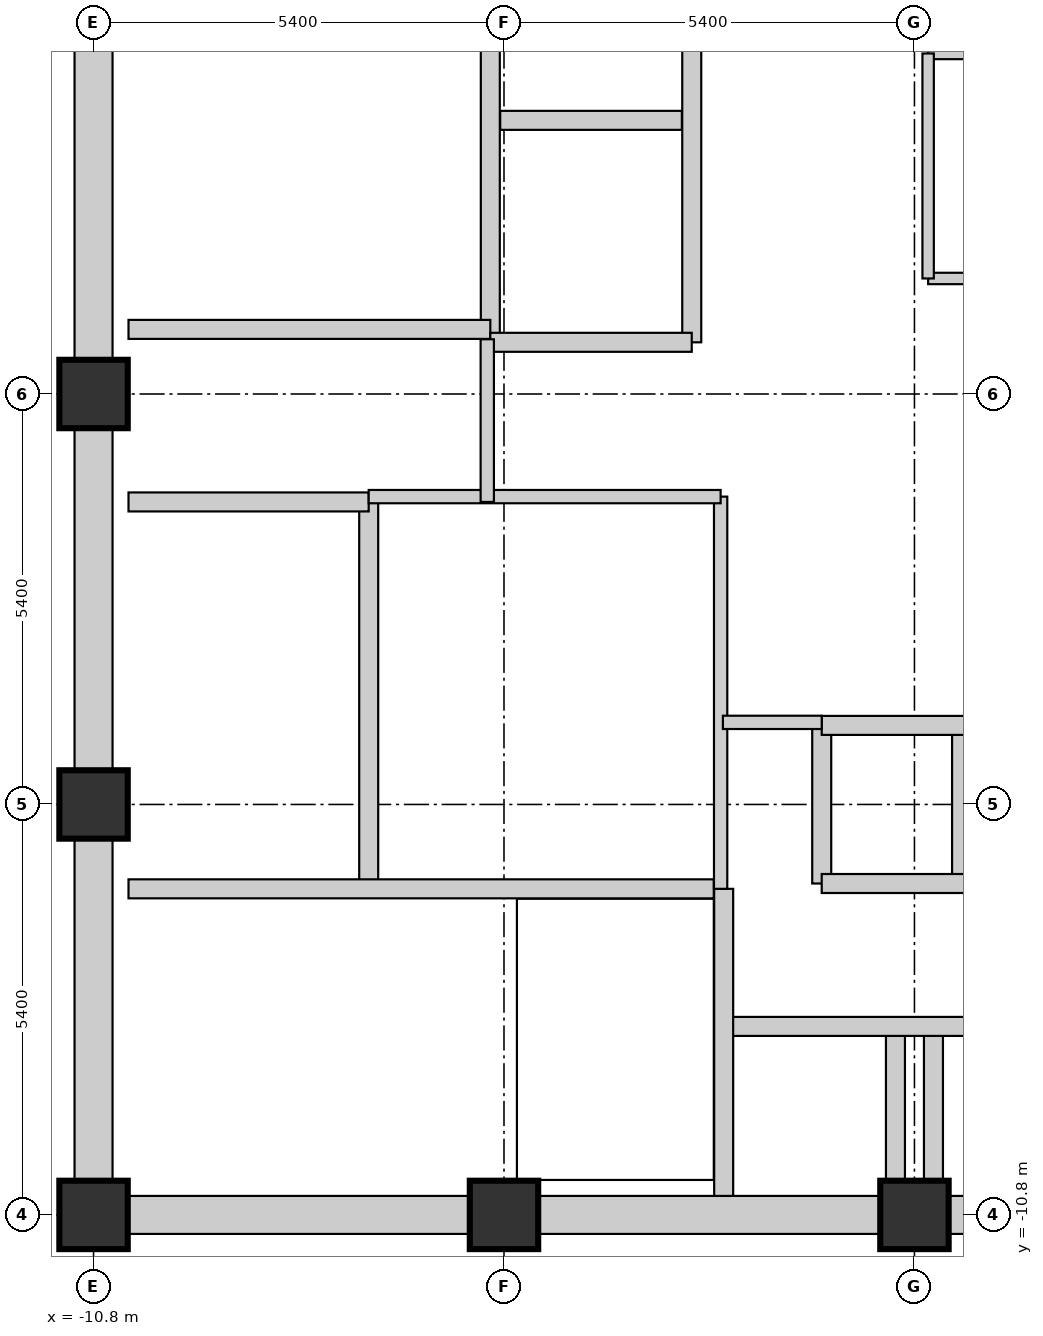
"""IFC4 building model, lengths in metres.
Left out: names, types, materials, properties, quantities, classifications, styles, units other than length and angle.
Written with IfcOpenShell. Run it as: python <this file> out.ifc"""

import sys

from ifc_helpers import new_model, si_unit, direction, frame, frame_2d, origin, origin_2d, place, context, subcontext, project, spatial, rectangle, extrude, element, fill, save


model = new_model("IFC4")
c1 = context("Model", 3, precision=1e-05, world=origin(), true_north=direction((0.0, 1.0)))
c2 = subcontext(c1, "Body", "Model", "MODEL_VIEW")
j1 = project(units=[si_unit("LENGTHUNIT", "METRE"), si_unit("PLANEANGLEUNIT", "RADIAN")], contexts=[c1])
p1 = place(None, origin())
s1 = spatial("IfcSite", under=j1, at=p1, CompositionType="ELEMENT")
p2 = place(p1, origin())
s2 = spatial("IfcBuilding", under=s1, at=p2, CompositionType="ELEMENT")
p3 = place(p2, frame((0.0, 0.0, 337.5)))
s3 = spatial("IfcBuildingStorey", under=s2, at=p3, CompositionType="ELEMENT", Elevation=337.5)
for number, where, z_axis, x_axis in (
    (1, (-10.8, -10.8, 0.0), (0.0, 0.0, 1.0), (1.0, 0.0, 0.0)),
    (2, (-10.8, -5.4, 0.0), (0.0, 0.0, 1.0), (1.0, 0.0, 0.0)),
    (3, (-10.8, 0.0, 0.0), (0.0, 0.0, 1.0), (1.0, 0.0, 0.0)),
    (4, (-5.4, -10.8, 0.0), (0.0, 0.0, 1.0), (1.0, 0.0, 0.0)),
    (5, (0.0, -10.8, 0.0), (0.0, 0.0, 1.0), (1.0, 0.0, 0.0)),
):
    element("IfcColumn", number, at=place(p3, frame(where, z_axis=z_axis, x_axis=x_axis)), inside=s3, PredefinedType="COLUMN", context=c2, shape_type="SweptSolid", body=[
        extrude(rectangle(XDim=0.9, YDim=0.9, at=origin_2d()), origin(), (0.0, 0.0, 1.0), 4.5),
    ])
for number, where, z_axis, x_axis in (
    (6, (-10.34, -10.8, 0.0), (0.0, 0.0, 1.0), (1.0, 0.0, 0.0)),
    (7, (-10.8, -10.34, 0.0), (0.0, 0.0, 1.0), (0.0, 1.0, 0.0)),
    (8, (-4.94, -10.8, 0.0), (0.0, 0.0, 1.0), (1.0, 0.0, 0.0)),
):
    element("IfcWall", number, at=place(p3, frame(where, z_axis=z_axis, x_axis=x_axis)), inside=s3, PredefinedType="SHEAR", context=c2, shape_type="SweptSolid", body=[
        extrude(rectangle(XDim=4.48, YDim=0.5, at=frame_2d((2.24, 0.0))), origin(), (0.0, 0.0, 1.0), 4.5),
    ])
p4 = place(p3, frame((-10.8, -4.94, 0.0), z_axis=(0.0, 0.0, 1.0), x_axis=(0.0, 1.0, 0.0)))
e9 = element("IfcWall", 9, at=p4, inside=s3, PredefinedType="SHEAR", context=c2, shape_type="SweptSolid", body=[
    extrude(rectangle(XDim=4.48, YDim=0.5, at=frame_2d((2.24, 0.0))), origin(), (0.0, 0.0, 1.0), 4.5),
])
p5 = place(p4, frame((1.69, 0.0, 0.0)))
e10 = element("IfcOpeningElement", 10, at=p5, cuts=e9, PredefinedType="OPENING", context=c2, shape_type="SweptSolid", body=[
    extrude(rectangle(XDim=1.1, YDim=2.1, at=frame_2d((0.55, 1.05))), frame((0.0, 0.26, 0.0), z_axis=(0.0, -1.0, 0.0), x_axis=(1.0, 0.0, 0.0)), (0.0, 0.0, 1.0), 0.52),
])
p6 = place(p3, frame((0.46, -10.8, 0.0), z_axis=(0.0, 0.0, 1.0), x_axis=(1.0, 0.0, 0.0)))
e11 = element("IfcWall", 11, at=p6, inside=s3, PredefinedType="SHEAR", context=c2, shape_type="SweptSolid", body=[
    extrude(rectangle(XDim=4.48, YDim=0.5, at=frame_2d((2.24, 0.0))), origin(), (0.0, 0.0, 1.0), 4.5),
])
p7 = place(p3, frame((-10.8, 0.46, 0.0), z_axis=(0.0, 0.0, 1.0), x_axis=(0.0, 1.0, 0.0)))
e12 = element("IfcWall", 12, at=p7, inside=s3, PredefinedType="SHEAR", context=c2, shape_type="SweptSolid", body=[
    extrude(rectangle(XDim=4.48, YDim=0.5, at=frame_2d((2.24, 0.0))), origin(), (0.0, 0.0, 1.0), 4.5),
])
p8 = place(p7, frame((1.69, 0.0, 0.0)))
e13 = element("IfcOpeningElement", 13, at=p8, cuts=e12, PredefinedType="OPENING", context=c2, shape_type="SweptSolid", body=[
    extrude(rectangle(XDim=1.1, YDim=2.1, at=frame_2d((0.55, 1.05))), frame((0.0, 0.26, 0.0), z_axis=(0.0, -1.0, 0.0), x_axis=(1.0, 0.0, 0.0)), (0.0, 0.0, 1.0), 0.52),
])
p9 = place(p3, frame((-5.58, 0.72, 0.0), z_axis=(0.0, 0.0, 1.0), x_axis=(0.0, 1.0, 0.0)))
e14 = element("IfcWall", 14, at=p9, inside=s3, PredefinedType="SHEAR", context=c2, shape_type="SweptSolid", body=[
    extrude(rectangle(XDim=5.79, YDim=0.25, at=frame_2d((2.895, 0.0))), origin(), (0.0, 0.0, 1.0), 4.5),
])
p10 = place(p9, frame((3.35, 0.0, 0.0)))
e15 = element("IfcOpeningElement", 15, at=p10, cuts=e14, PredefinedType="OPENING", context=c2, shape_type="SweptSolid", body=[
    extrude(rectangle(XDim=1.1, YDim=2.1, at=frame_2d((0.55, 1.05))), frame((0.0, 0.135, 0.0), z_axis=(0.0, -1.0, 0.0), x_axis=(1.0, 0.0, 0.0)), (0.0, 0.0, 1.0), 0.27),
])
p11 = place(p3, frame((-10.34, 0.85, 0.0), z_axis=(0.0, 0.0, 1.0), x_axis=(1.0, 0.0, 0.0)))
e16 = element("IfcWall", 16, at=p11, inside=s3, PredefinedType="SHEAR", context=c2, shape_type="SweptSolid", body=[
    extrude(rectangle(XDim=4.76, YDim=0.25, at=frame_2d((2.38, 0.0))), origin(), (0.0, 0.0, 1.0), 4.5),
])
p12 = place(p11, frame((1.4, 0.0, 0.0)))
e17 = element("IfcOpeningElement", 17, at=p12, cuts=e16, PredefinedType="OPENING", context=c2, shape_type="SweptSolid", body=[
    extrude(rectangle(XDim=0.95, YDim=2.1, at=frame_2d((0.475, 1.05))), frame((0.0, 0.135, 0.0), z_axis=(0.0, -1.0, 0.0), x_axis=(1.0, 0.0, 0.0)), (0.0, 0.0, 1.0), 0.27),
])
p13 = place(p3, frame((0.62, -6.34, 0.0), z_axis=(0.0, 0.0, 1.0), x_axis=(0.0, 1.0, 0.0)))
e18 = element("IfcWall", 18, at=p13, inside=s3, PredefinedType="SHEAR", context=c2, shape_type="SweptSolid", body=[
    extrude(rectangle(XDim=1.88, YDim=0.25, at=frame_2d((0.94, 0.0))), origin(), (0.0, 0.0, 1.0), 4.5),
])
for number, where, z_axis, x_axis in (
    (19, (-0.25, -10.35, 0.0), (0.0, 0.0, 1.0), (0.0, 1.0, 0.0)),
    (20, (0.25, -10.35, 0.0), (0.0, 0.0, 1.0), (0.0, 1.0, 0.0)),
):
    element("IfcWall", number, at=place(p3, frame(where, z_axis=z_axis, x_axis=x_axis)), inside=s3, PredefinedType="SHEAR", context=c2, shape_type="SweptSolid", body=[
        extrude(rectangle(XDim=1.91, YDim=0.25, at=frame_2d((0.955, 0.0))), origin(), (0.0, 0.0, 1.0), 4.5),
    ])
p14 = place(p3, frame((-1.22, -6.44, 0.0), z_axis=(0.0, 0.0, 1.0), x_axis=(0.0, 1.0, 0.0)))
e21 = element("IfcWall", 21, at=p14, inside=s3, PredefinedType="SHEAR", context=c2, shape_type="SweptSolid", body=[
    extrude(rectangle(XDim=2.08, YDim=0.25, at=frame_2d((1.04, 0.0))), origin(), (0.0, 0.0, 1.0), 4.5),
])
p15 = place(p3, frame((-1.22, -6.44, 0.0), z_axis=(0.0, 0.0, 1.0), x_axis=(1.0, 0.0, 0.0)))
e22 = element("IfcWall", 22, at=p15, inside=s3, PredefinedType="SHEAR", context=c2, shape_type="SweptSolid", body=[
    extrude(rectangle(XDim=3.67, YDim=0.25, at=frame_2d((1.835, 0.0))), origin(), (0.0, 0.0, 1.0), 4.5),
])
p16 = place(p15, frame((0.35, 0.0, 0.0)))
e23 = element("IfcOpeningElement", 23, at=p16, cuts=e22, PredefinedType="OPENING", context=c2, shape_type="SweptSolid", body=[
    extrude(rectangle(XDim=1.1, YDim=2.1, at=frame_2d((0.55, 1.05))), frame((0.0, 0.135, 0.0), z_axis=(0.0, -1.0, 0.0), x_axis=(1.0, 0.0, 0.0)), (0.0, 0.0, 1.0), 0.27),
])
p17 = place(p15, frame((2.22, 0.0, 0.0)))
e24 = element("IfcOpeningElement", 24, at=p17, cuts=e22, PredefinedType="OPENING", context=c2, shape_type="SweptSolid", body=[
    extrude(rectangle(XDim=1.1, YDim=2.1, at=frame_2d((0.55, 1.05))), frame((0.0, 0.135, 0.0), z_axis=(0.0, -1.0, 0.0), x_axis=(1.0, 0.0, 0.0)), (0.0, 0.0, 1.0), 0.27),
])
p18 = place(p3, frame((-2.48, -8.32, 0.0), z_axis=(0.0, 0.0, 1.0), x_axis=(1.0, 0.0, 0.0)))
e25 = element("IfcWall", 25, at=p18, inside=s3, PredefinedType="SHEAR", context=c2, shape_type="SweptSolid", body=[
    extrude(rectangle(XDim=4.93, YDim=0.25, at=frame_2d((2.465, 0.0))), origin(), (0.0, 0.0, 1.0), 4.5),
])
p19 = place(p18, frame((0.55, 0.0, 0.0)))
e26 = element("IfcOpeningElement", 26, at=p19, cuts=e25, PredefinedType="OPENING", context=c2, shape_type="SweptSolid", body=[
    extrude(rectangle(XDim=1.1, YDim=2.1, at=frame_2d((0.55, 1.05))), frame((0.0, 0.135, 0.0), z_axis=(0.0, -1.0, 0.0), x_axis=(1.0, 0.0, 0.0)), (0.0, 0.0, 1.0), 0.27),
])
p20 = place(p18, frame((3.25, 0.0, 0.0)))
e27 = element("IfcOpeningElement", 27, at=p20, cuts=e25, PredefinedType="OPENING", context=c2, shape_type="SweptSolid", body=[
    extrude(rectangle(XDim=1.1, YDim=2.1, at=frame_2d((0.55, 1.05))), frame((0.0, 0.135, 0.0), z_axis=(0.0, -1.0, 0.0), x_axis=(1.0, 0.0, 0.0)), (0.0, 0.0, 1.0), 0.27),
])
p21 = place(p3, frame((-1.22, -4.36, 0.0), z_axis=(0.0, 0.0, 1.0), x_axis=(1.0, 0.0, 0.0)))
e28 = element("IfcWall", 28, at=p21, inside=s3, PredefinedType="SHEAR", context=c2, shape_type="SweptSolid", body=[
    extrude(rectangle(XDim=4.03, YDim=0.25, at=frame_2d((2.015, 0.0))), origin(), (0.0, 0.0, 1.0), 4.5),
])
p22 = place(p3, frame((-2.51, -10.55, 0.0), z_axis=(0.0, 0.0, 1.0), x_axis=(0.0, 1.0, 0.0)))
e29 = element("IfcWall", 29, at=p22, inside=s3, PredefinedType="SHEAR", context=c2, shape_type="SweptSolid", body=[
    extrude(rectangle(XDim=4.04, YDim=0.25, at=frame_2d((2.02, 0.0))), origin(), (0.0, 0.0, 1.0), 4.5),
])
p23 = place(p3, frame((-7.18, -6.51, 0.0), z_axis=(0.0, 0.0, 1.0), x_axis=(0.0, 1.0, 0.0)))
e30 = element("IfcWall", 30, at=p23, inside=s3, PredefinedType="SHEAR", context=c2, shape_type="SweptSolid", body=[
    extrude(rectangle(XDim=5.09, YDim=0.25, at=frame_2d((2.545, 0.0))), origin(), (0.0, 0.0, 1.0), 4.5),
])
p24 = place(p3, frame((-10.34, -1.42, 0.0), z_axis=(0.0, 0.0, 1.0), x_axis=(1.0, 0.0, 0.0)))
e31 = element("IfcWall", 31, at=p24, inside=s3, PredefinedType="SHEAR", context=c2, shape_type="SweptSolid", body=[
    extrude(rectangle(XDim=3.16, YDim=0.25, at=frame_2d((1.58, 0.0))), origin(), (0.0, 0.0, 1.0), 4.5),
])
p25 = place(p3, frame((-10.34, -6.51, 0.0), z_axis=(0.0, 0.0, 1.0), x_axis=(1.0, 0.0, 0.0)))
e32 = element("IfcWall", 32, at=p25, inside=s3, PredefinedType="SHEAR", context=c2, shape_type="SweptSolid", body=[
    extrude(rectangle(XDim=7.7, YDim=0.25, at=frame_2d((3.85, 0.0))), origin(), (0.0, 0.0, 1.0), 4.5),
])
p26 = place(p25, frame((0.35, 0.0, 0.0)))
e33 = element("IfcOpeningElement", 33, at=p26, cuts=e32, PredefinedType="OPENING", context=c2, shape_type="SweptSolid", body=[
    extrude(rectangle(XDim=1.1, YDim=2.1, at=frame_2d((0.55, 1.05))), frame((0.0, 0.135, 0.0), z_axis=(0.0, -1.0, 0.0), x_axis=(1.0, 0.0, 0.0)), (0.0, 0.0, 1.0), 0.27),
])
p27 = place(p3, frame((-2.93, 0.68, 0.0), z_axis=(0.0, 0.0, 1.0), x_axis=(0.0, 1.0, 0.0)))
e34 = element("IfcWall", 34, at=p27, inside=s3, PredefinedType="SHEAR", context=c2, shape_type="SweptSolid", body=[
    extrude(rectangle(XDim=5.83, YDim=0.25, at=frame_2d((2.915, 0.0))), origin(), (0.0, 0.0, 1.0), 4.5),
])
p28 = place(p27, frame((0.75, 0.0, 0.0)))
e35 = element("IfcOpeningElement", 35, at=p28, cuts=e34, PredefinedType="OPENING", context=c2, shape_type="SweptSolid", body=[
    extrude(rectangle(XDim=1.2, YDim=2.1, at=frame_2d((0.6, 1.05))), frame((0.0, 0.135, 0.0), z_axis=(0.0, -1.0, 0.0), x_axis=(1.0, 0.0, 0.0)), (0.0, 0.0, 1.0), 0.27),
])
p29 = place(p3, frame((-5.45, 3.6, 0.0), z_axis=(0.0, 0.0, 1.0), x_axis=(1.0, 0.0, 0.0)))
e36 = element("IfcWall", 36, at=p29, inside=s3, PredefinedType="SHEAR", context=c2, shape_type="SweptSolid", body=[
    extrude(rectangle(XDim=2.39, YDim=0.25, at=frame_2d((1.195, 0.0))), origin(), (0.0, 0.0, 1.0), 4.5),
])
p30 = place(p3, frame((-5.58, 0.68, 0.0), z_axis=(0.0, 0.0, 1.0), x_axis=(1.0, 0.0, 0.0)))
e37 = element("IfcWall", 37, at=p30, inside=s3, PredefinedType="SHEAR", context=c2, shape_type="SweptSolid", body=[
    extrude(rectangle(XDim=2.65, YDim=0.25, at=frame_2d((1.325, 0.0))), origin(), (0.0, 0.0, 1.0), 4.5),
])
for number, where, z_axis, x_axis in (
    (38, (0.18, 4.48, 0.0), (0.0, 0.0, 1.0), (1.0, 0.0, 0.0)),
    (39, (0.18, 1.52, 0.0), (0.0, 0.0, 1.0), (1.0, 0.0, 0.0)),
):
    element("IfcWall", number, at=place(p3, frame(where, z_axis=z_axis, x_axis=x_axis)), inside=s3, PredefinedType="PARTITIONING", context=c2, shape_type="SweptSolid", body=[
        extrude(rectangle(XDim=2.67, YDim=0.15, at=frame_2d((1.335, 0.0))), origin(), (0.0, 0.0, 1.0), 4.22),
    ])
p31 = place(p3, frame((0.18, 1.52, 0.0), z_axis=(0.0, 0.0, 1.0), x_axis=(0.0, 1.0, 0.0)))
e40 = element("IfcWall", 40, at=p31, inside=s3, PredefinedType="PARTITIONING", context=c2, shape_type="SweptSolid", body=[
    extrude(rectangle(XDim=2.96, YDim=0.15, at=frame_2d((1.48, 0.0))), origin(), (0.0, 0.0, 1.0), 4.22),
])
p32 = place(p31, frame((0.95, 0.0, 0.0)))
e41 = element("IfcOpeningElement", 41, at=p32, cuts=e40, PredefinedType="OPENING", context=c2, shape_type="SweptSolid", body=[
    extrude(rectangle(XDim=0.85, YDim=2.1, at=frame_2d((0.425, 1.05))), frame((0.0, 0.085, 0.0), z_axis=(0.0, -1.0, 0.0), x_axis=(1.0, 0.0, 0.0)), (0.0, 0.0, 1.0), 0.17),
])
p33 = place(p3, frame((-2.55, -6.51, 0.0), z_axis=(0.0, 0.0, 1.0), x_axis=(0.0, 1.0, 0.0)))
e42 = element("IfcWall", 42, at=p33, inside=s3, PredefinedType="PARTITIONING", context=c2, shape_type="SweptSolid", body=[
    extrude(rectangle(XDim=5.16, YDim=0.175, at=frame_2d((2.58, 0.0))), origin(), (0.0, 0.0, 1.0), 4.22),
])
p34 = place(p33, frame((0.95, 0.0, 0.0)))
e43 = element("IfcOpeningElement", 43, at=p34, cuts=e42, PredefinedType="OPENING", context=c2, shape_type="SweptSolid", body=[
    extrude(rectangle(XDim=0.85, YDim=2.1, at=frame_2d((0.425, 1.05))), frame((0.0, 0.097, 0.0), z_axis=(0.0, -1.0, 0.0), x_axis=(1.0, 0.0, 0.0)), (0.0, 0.0, 1.0), 0.195),
])
p35 = place(p3, frame((-7.18, -1.35, 0.0), z_axis=(0.0, 0.0, 1.0), x_axis=(1.0, 0.0, 0.0)))
e44 = element("IfcWall", 44, at=p35, inside=s3, PredefinedType="PARTITIONING", context=c2, shape_type="SweptSolid", body=[
    extrude(rectangle(XDim=4.63, YDim=0.175, at=frame_2d((2.315, 0.0))), origin(), (0.0, 0.0, 1.0), 4.22),
])
p36 = place(p3, frame((-5.62, -1.42, 0.0), z_axis=(0.0, 0.0, 1.0), x_axis=(0.0, 1.0, 0.0)))
e45 = element("IfcWall", 45, at=p36, inside=s3, PredefinedType="PARTITIONING", context=c2, shape_type="SweptSolid", body=[
    extrude(rectangle(XDim=2.14, YDim=0.175, at=frame_2d((1.07, 0.0))), origin(), (0.0, 0.0, 1.0), 4.22),
])
p37 = place(p3, frame((-2.52, -4.32, 0.0), z_axis=(0.0, 0.0, 1.0), x_axis=(1.0, 0.0, 0.0)))
e46 = element("IfcWall", 46, at=p37, inside=s3, PredefinedType="PARTITIONING", context=c2, shape_type="SweptSolid", body=[
    extrude(rectangle(XDim=1.3, YDim=0.175, at=frame_2d((0.65, 0.0))), origin(), (0.0, 0.0, 1.0), 4.22),
])
p38 = place(p37, frame((0.22, 0.0, 0.0)))
e47 = element("IfcOpeningElement", 47, at=p38, cuts=e46, PredefinedType="OPENING", context=c2, shape_type="SweptSolid", body=[
    extrude(rectangle(XDim=0.85, YDim=2.1, at=frame_2d((0.425, 1.05))), frame((0.0, 0.097, 0.0), z_axis=(0.0, -1.0, 0.0), x_axis=(1.0, 0.0, 0.0)), (0.0, 0.0, 1.0), 0.195),
])
p39 = place(p32, origin())
e48 = element("IfcDoor", 48, at=p39, inside=s3, OperationType="SINGLE_SWING_RIGHT", PredefinedType="DOOR", context=c2, shape_type="SweptSolid", body=[
    extrude(rectangle(XDim=0.85, YDim=2.1, at=frame_2d((0.425, 1.05))), frame((0.0, 0.025, 0.0), z_axis=(0.0, -1.0, 0.0), x_axis=(1.0, 0.0, 0.0)), (0.0, 0.0, 1.0), 0.05),
])
fill(e41, e48)
p40 = place(p26, origin())
e49 = element("IfcDoor", 49, at=p40, inside=s3, OperationType="SINGLE_SWING_RIGHT", PredefinedType="DOOR", context=c2, shape_type="SweptSolid", body=[
    extrude(rectangle(XDim=1.1, YDim=2.1, at=frame_2d((0.55, 1.05))), frame((0.0, 0.025, 0.0), z_axis=(0.0, -1.0, 0.0), x_axis=(1.0, 0.0, 0.0)), (0.0, 0.0, 1.0), 0.05),
])
fill(e33, e49)
p41 = place(p8, origin())
e50 = element("IfcDoor", 50, at=p41, inside=s3, OperationType="SINGLE_SWING_LEFT", PredefinedType="DOOR", context=c2, shape_type="SweptSolid", body=[
    extrude(rectangle(XDim=1.1, YDim=2.1, at=frame_2d((0.55, 1.05))), frame((0.0, 0.025, 0.0), z_axis=(0.0, -1.0, 0.0), x_axis=(1.0, 0.0, 0.0)), (0.0, 0.0, 1.0), 0.05),
])
fill(e13, e50)
p42 = place(p5, origin())
e51 = element("IfcDoor", 51, at=p42, inside=s3, OperationType="SINGLE_SWING_LEFT", PredefinedType="DOOR", context=c2, shape_type="SweptSolid", body=[
    extrude(rectangle(XDim=1.1, YDim=2.1, at=frame_2d((0.55, 1.05))), frame((0.0, 0.025, 0.0), z_axis=(0.0, -1.0, 0.0), x_axis=(1.0, 0.0, 0.0)), (0.0, 0.0, 1.0), 0.05),
])
fill(e10, e51)
p43 = place(p12, origin())
e52 = element("IfcDoor", 52, at=p43, inside=s3, OperationType="SINGLE_SWING_RIGHT", PredefinedType="DOOR", context=c2, shape_type="SweptSolid", body=[
    extrude(rectangle(XDim=0.95, YDim=2.1, at=frame_2d((0.475, 1.05))), frame((0.0, 0.025, 0.0), z_axis=(0.0, -1.0, 0.0), x_axis=(1.0, 0.0, 0.0)), (0.0, 0.0, 1.0), 0.05),
])
fill(e17, e52)
p44 = place(p10, origin())
e53 = element("IfcDoor", 53, at=p44, inside=s3, OperationType="SLIDING_TO_LEFT", PredefinedType="DOOR", context=c2, shape_type="SweptSolid", body=[
    extrude(rectangle(XDim=1.1, YDim=2.1, at=frame_2d((0.55, 1.05))), frame((0.0, 0.025, 0.0), z_axis=(0.0, -1.0, 0.0), x_axis=(1.0, 0.0, 0.0)), (0.0, 0.0, 1.0), 0.05),
])
fill(e15, e53)
p45 = place(p28, origin())
e54 = element("IfcDoor", 54, at=p45, inside=s3, OperationType="SLIDING_TO_LEFT", PredefinedType="DOOR", context=c2, shape_type="SweptSolid", body=[
    extrude(rectangle(XDim=1.2, YDim=2.1, at=frame_2d((0.6, 1.05))), frame((0.0, 0.025, 0.0), z_axis=(0.0, -1.0, 0.0), x_axis=(1.0, 0.0, 0.0)), (0.0, 0.0, 1.0), 0.05),
])
fill(e35, e54)
p46 = place(p38, origin())
e55 = element("IfcDoor", 55, at=p46, inside=s3, OperationType="SINGLE_SWING_LEFT", PredefinedType="DOOR", context=c2, shape_type="SweptSolid", body=[
    extrude(rectangle(XDim=0.85, YDim=2.1, at=frame_2d((0.425, 1.05))), frame((0.0, 0.025, 0.0), z_axis=(0.0, -1.0, 0.0), x_axis=(1.0, 0.0, 0.0)), (0.0, 0.0, 1.0), 0.05),
])
fill(e47, e55)
p47 = place(p16, origin())
e56 = element("IfcDoor", 56, at=p47, inside=s3, OperationType="SLIDING_TO_LEFT", PredefinedType="DOOR", context=c2, shape_type="SweptSolid", body=[
    extrude(rectangle(XDim=1.1, YDim=2.1, at=frame_2d((0.55, 1.05))), frame((0.0, 0.025, 0.0), z_axis=(0.0, -1.0, 0.0), x_axis=(1.0, 0.0, 0.0)), (0.0, 0.0, 1.0), 0.05),
])
fill(e23, e56)
p48 = place(p19, origin())
e57 = element("IfcDoor", 57, at=p48, inside=s3, OperationType="SLIDING_TO_LEFT", PredefinedType="DOOR", context=c2, shape_type="SweptSolid", body=[
    extrude(rectangle(XDim=1.1, YDim=2.1, at=frame_2d((0.55, 1.05))), frame((0.0, 0.025, 0.0), z_axis=(0.0, -1.0, 0.0), x_axis=(1.0, 0.0, 0.0)), (0.0, 0.0, 1.0), 0.05),
])
fill(e26, e57)
p49 = place(p34, origin())
e58 = element("IfcDoor", 58, at=p49, inside=s3, OperationType="SINGLE_SWING_LEFT", PredefinedType="DOOR", context=c2, shape_type="SweptSolid", body=[
    extrude(rectangle(XDim=0.85, YDim=2.1, at=frame_2d((0.425, 1.05))), frame((0.0, 0.025, 0.0), z_axis=(0.0, -1.0, 0.0), x_axis=(1.0, 0.0, 0.0)), (0.0, 0.0, 1.0), 0.05),
])
fill(e43, e58)
save(model, sys.argv[1])
